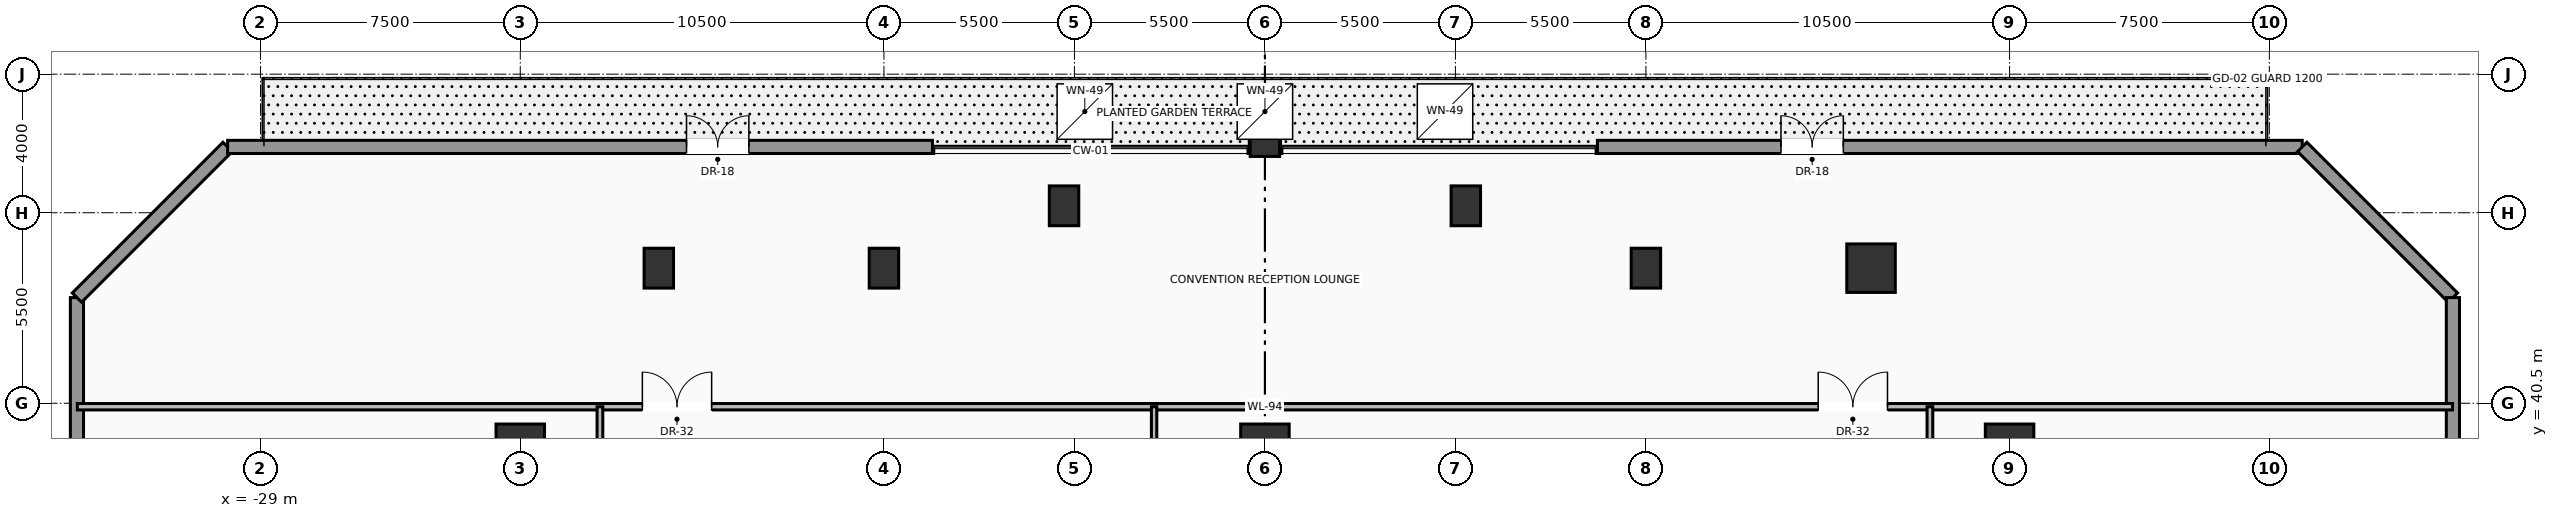
"""IFC4 building model, lengths in metres.
Left out: names, types, materials, properties, quantities, classifications, styles, units other than length and angle.
Written with IfcOpenShell. Run it as: python <this file> out.ifc"""

import sys

from ifc_helpers import new_model, si_unit, direction, frame, frame_2d, origin, origin_2d, place, context, subcontext, project, spatial, rectangle, hollow_rectangle, extrude, source, transform, mapped, element, fill, save


model = new_model("IFC4")
c1 = context("Model", 3, precision=1e-05, world=origin(), true_north=direction((0.0, 1.0)))
c2 = subcontext(c1, "Body", "Model", "MODEL_VIEW")
j1 = project(units=[si_unit("LENGTHUNIT", "METRE"), si_unit("PLANEANGLEUNIT", "RADIAN")], contexts=[c1])
p1 = place(None, origin())
s1 = spatial("IfcSite", under=j1, at=p1, CompositionType="ELEMENT")
p2 = place(p1, origin())
s2 = spatial("IfcBuilding", under=s1, at=p2, CompositionType="ELEMENT")
p3 = place(p2, frame((0.0, 0.0, 5.5)))
s3 = spatial("IfcBuildingStorey", under=s2, at=p3, CompositionType="ELEMENT", Elevation=5.5)
m1 = source(origin(), c2, "Body", "SweptSolid", [
    extrude(rectangle(XDim=0.85, YDim=1.15, at=origin_2d()), origin(), (0.0, 0.0, 1.0), 5.16),
])
for number, where, z_axis, x_axis in (
    (1, (-5.8, 46.2, 0.0), (0.0, 0.0, 1.0), (1.0, 0.0, 0.0)),
    (2, (5.8, 46.2, 0.0), (0.0, 0.0, 1.0), (1.0, 0.0, 0.0)),
    (3, (0.0, 48.2, 0.0), (0.0, 0.0, 1.0), (1.0, 0.0, 0.0)),
):
    element("IfcColumn", number, at=place(p3, frame(where, z_axis=z_axis, x_axis=x_axis)), inside=s3, PredefinedType="COLUMN", context=c2, shape_type="MappedRepresentation", body=[
        mapped(m1, transform((0.0, 0.0, 0.0), scale=1.0)),
    ])
m2 = source(origin(), c2, "Body", "SweptSolid", [
    extrude(hollow_rectangle(XDim=1.4, YDim=1.4, WallThickness=0.07, at=origin_2d()), origin(), (0.0, 0.0, 1.0), 5.5),
])
p4 = place(p3, frame((-21.5, 39.2, 0.0), z_axis=(0.0, 0.0, 1.0), x_axis=(1.0, 0.0, 0.0)))
e4 = element("IfcColumn", 4, at=p4, inside=s3, PredefinedType="COLUMN", context=c2, shape_type="MappedRepresentation", body=[
    mapped(m2, transform((0.0, 0.0, 0.0), scale=1.0)),
])
m3 = source(origin(), c2, "Body", "SweptSolid", [
    extrude(rectangle(XDim=0.85, YDim=1.15, at=origin_2d()), origin(), (0.0, 0.0, 1.0), 5.5),
])
p5 = place(p3, frame((-11.0, 44.4, 0.0), z_axis=(0.0, 0.0, 1.0), x_axis=(1.0, 0.0, 0.0)))
e5 = element("IfcColumn", 5, at=p5, inside=s3, PredefinedType="COLUMN", context=c2, shape_type="MappedRepresentation", body=[
    mapped(m3, transform((0.0, 0.0, 0.0), scale=1.0)),
])
p6 = place(p3, frame((0.0, 39.2, 0.0), z_axis=(0.0, 0.0, 1.0), x_axis=(1.0, 0.0, 0.0)))
e6 = element("IfcColumn", 6, at=p6, inside=s3, PredefinedType="COLUMN", context=c2, shape_type="MappedRepresentation", body=[
    mapped(m2, transform((0.0, 0.0, 0.0), scale=1.0)),
])
p7 = place(p3, frame((11.0, 44.4, 0.0), z_axis=(0.0, 0.0, 1.0), x_axis=(1.0, 0.0, 0.0)))
e7 = element("IfcColumn", 7, at=p7, inside=s3, PredefinedType="COLUMN", context=c2, shape_type="MappedRepresentation", body=[
    mapped(m3, transform((0.0, 0.0, 0.0), scale=1.0)),
])
p8 = place(p3, frame((21.5, 39.2, 0.0), z_axis=(0.0, 0.0, 1.0), x_axis=(1.0, 0.0, 0.0)))
e8 = element("IfcColumn", 8, at=p8, inside=s3, PredefinedType="COLUMN", context=c2, shape_type="MappedRepresentation", body=[
    mapped(m2, transform((0.0, 0.0, 0.0), scale=1.0)),
])
p9 = place(p3, frame((-17.5, 44.4, 0.0), z_axis=(0.0, 0.0, 1.0), x_axis=(1.0, 0.0, 0.0)))
e9 = element("IfcColumn", 9, at=p9, inside=s3, PredefinedType="COLUMN", context=c2, shape_type="MappedRepresentation", body=[
    mapped(m3, transform((0.0, 0.0, 0.0), scale=1.0)),
])
p10 = place(p3, frame((17.5, 44.4, 0.0), z_axis=(0.0, 0.0, 1.0), x_axis=(1.0, 0.0, 0.0)))
e10 = element("IfcColumn", 10, at=p10, inside=s3, PredefinedType="COLUMN", context=c2, shape_type="MappedRepresentation", body=[
    mapped(m2, transform((0.0, 0.0, 0.0), scale=1.0)),
])
p11 = place(p3, frame((-34.3, 4.35, 0.0), z_axis=(0.0, 0.0, 1.0), x_axis=(0.0, 1.0, 0.0)))
e11 = element("IfcWall", 11, at=p11, inside=s3, PredefinedType="SOLIDWALL", context=c2, shape_type="SweptSolid", body=[
    extrude(rectangle(XDim=39.2, YDim=0.38, at=frame_2d((19.6, 0.0))), origin(), (0.0, 0.0, 1.0), 4.11),
])
p12 = place(p11, frame((6.75, 0.0, 0.95)))
e12 = element("IfcOpeningElement", 12, at=p12, cuts=e11, PredefinedType="OPENING", context=c2, shape_type="SweptSolid", body=[
    extrude(rectangle(XDim=1.8, YDim=2.4, at=frame_2d((0.9, 1.2))), frame((0.0, 0.2, 0.0), z_axis=(0.0, -1.0, 0.0), x_axis=(1.0, 0.0, 0.0)), (0.0, 0.0, 1.0), 0.4),
])
p13 = place(p11, frame((17.25, 0.0, 0.95)))
e13 = element("IfcOpeningElement", 13, at=p13, cuts=e11, PredefinedType="OPENING", context=c2, shape_type="SweptSolid", body=[
    extrude(rectangle(XDim=1.8, YDim=2.4, at=frame_2d((0.9, 1.2))), frame((0.0, 0.2, 0.0), z_axis=(0.0, -1.0, 0.0), x_axis=(1.0, 0.0, 0.0)), (0.0, 0.0, 1.0), 0.4),
])
p14 = place(p11, frame((27.75, 0.0, 0.95)))
e14 = element("IfcOpeningElement", 14, at=p14, cuts=e11, PredefinedType="OPENING", context=c2, shape_type="SweptSolid", body=[
    extrude(rectangle(XDim=1.8, YDim=2.4, at=frame_2d((0.9, 1.2))), frame((0.0, 0.2, 0.0), z_axis=(0.0, -1.0, 0.0), x_axis=(1.0, 0.0, 0.0)), (0.0, 0.0, 1.0), 0.4),
])
p15 = place(p3, frame((-34.3, 43.55, 0.0), z_axis=(0.0, 0.0, 1.0), x_axis=(0.70712662395, 0.707086937867, 0.0)))
e15 = element("IfcWall", 15, at=p15, inside=s3, PredefinedType="SOLIDWALL", context=c2, shape_type="SweptSolid", body=[
    extrude(rectangle(XDim=6.152, YDim=0.38, at=frame_2d((3.076, 0.0))), origin(), (0.0, 0.0, 1.0), 4.11),
])
p16 = place(p3, frame((-0.45, 47.9, 0.0), z_axis=(0.0, 0.0, 1.0), x_axis=(1.0, 0.0, 0.0)))
e16 = element("IfcWall", 16, at=p16, inside=s3, PredefinedType="SOLIDWALL", context=c2, shape_type="SweptSolid", body=[
    extrude(rectangle(XDim=0.9, YDim=0.38, at=frame_2d((0.45, 0.0))), origin(), (0.0, 0.0, 1.0), 4.11),
])
p17 = place(p3, frame((-29.95, 47.9, 0.0), z_axis=(0.0, 0.0, 1.0), x_axis=(1.0, 0.0, 0.0)))
e17 = element("IfcWall", 17, at=p17, inside=s3, PredefinedType="SOLIDWALL", context=c2, shape_type="SweptSolid", body=[
    extrude(rectangle(XDim=20.35, YDim=0.38, at=frame_2d((10.175, 0.0))), origin(), (0.0, 0.0, 1.0), 4.11),
])
p18 = place(p17, frame((13.25, 0.0, 0.0)))
e18 = element("IfcOpeningElement", 18, at=p18, cuts=e17, PredefinedType="OPENING", context=c2, shape_type="SweptSolid", body=[
    extrude(rectangle(XDim=1.8, YDim=2.4, at=frame_2d((0.9, 1.2))), frame((0.0, 0.2, 0.0), z_axis=(0.0, -1.0, 0.0), x_axis=(1.0, 0.0, 0.0)), (0.0, 0.0, 1.0), 0.4),
])
p19 = place(p3, frame((9.6, 47.9, 0.0), z_axis=(0.0, 0.0, 1.0), x_axis=(1.0, 0.0, 0.0)))
e19 = element("IfcWall", 19, at=p19, inside=s3, PredefinedType="SOLIDWALL", context=c2, shape_type="SweptSolid", body=[
    extrude(rectangle(XDim=20.35, YDim=0.38, at=frame_2d((10.175, 0.0))), origin(), (0.0, 0.0, 1.0), 4.11),
])
p20 = place(p19, frame((5.3, 0.0, 0.0)))
e20 = element("IfcOpeningElement", 20, at=p20, cuts=e19, PredefinedType="OPENING", context=c2, shape_type="SweptSolid", body=[
    extrude(rectangle(XDim=1.8, YDim=2.4, at=frame_2d((0.9, 1.2))), frame((0.0, 0.2, 0.0), z_axis=(0.0, -1.0, 0.0), x_axis=(1.0, 0.0, 0.0)), (0.0, 0.0, 1.0), 0.4),
])
p21 = place(p3, frame((29.95, 47.9, 0.0), z_axis=(0.0, 0.0, 1.0), x_axis=(0.70712662395, -0.707086937867, 0.0)))
e21 = element("IfcWall", 21, at=p21, inside=s3, PredefinedType="SOLIDWALL", context=c2, shape_type="SweptSolid", body=[
    extrude(rectangle(XDim=6.152, YDim=0.38, at=frame_2d((3.076, 0.0))), origin(), (0.0, 0.0, 1.0), 4.11),
])
p22 = place(p3, frame((34.3, 43.55, 0.0), z_axis=(0.0, 0.0, 1.0), x_axis=(0.0, -1.0, 0.0)))
e22 = element("IfcWall", 22, at=p22, inside=s3, PredefinedType="SOLIDWALL", context=c2, shape_type="SweptSolid", body=[
    extrude(rectangle(XDim=39.2, YDim=0.38, at=frame_2d((19.6, 0.0))), origin(), (0.0, 0.0, 1.0), 4.11),
])
p23 = place(p22, frame((30.65, 0.0, 0.95)))
e23 = element("IfcOpeningElement", 23, at=p23, cuts=e22, PredefinedType="OPENING", context=c2, shape_type="SweptSolid", body=[
    extrude(rectangle(XDim=1.8, YDim=2.4, at=frame_2d((0.9, 1.2))), frame((0.0, 0.2, 0.0), z_axis=(0.0, -1.0, 0.0), x_axis=(1.0, 0.0, 0.0)), (0.0, 0.0, 1.0), 0.4),
])
p24 = place(p22, frame((20.15, 0.0, 0.95)))
e24 = element("IfcOpeningElement", 24, at=p24, cuts=e22, PredefinedType="OPENING", context=c2, shape_type="SweptSolid", body=[
    extrude(rectangle(XDim=1.8, YDim=2.4, at=frame_2d((0.9, 1.2))), frame((0.0, 0.2, 0.0), z_axis=(0.0, -1.0, 0.0), x_axis=(1.0, 0.0, 0.0)), (0.0, 0.0, 1.0), 0.4),
])
p25 = place(p22, frame((9.65, 0.0, 0.95)))
e25 = element("IfcOpeningElement", 25, at=p25, cuts=e22, PredefinedType="OPENING", context=c2, shape_type="SweptSolid", body=[
    extrude(rectangle(XDim=1.8, YDim=2.4, at=frame_2d((0.9, 1.2))), frame((0.0, 0.2, 0.0), z_axis=(0.0, -1.0, 0.0), x_axis=(1.0, 0.0, 0.0)), (0.0, 0.0, 1.0), 0.4),
])
p26 = place(p3, frame((-34.29, 40.4, 0.0), z_axis=(0.0, 0.0, 1.0), x_axis=(1.0, 0.0, 0.0)))
e26 = element("IfcWall", 26, at=p26, inside=s3, PredefinedType="PARTITIONING", context=c2, shape_type="SweptSolid", body=[
    extrude(rectangle(XDim=68.58, YDim=0.185, at=frame_2d((34.29, 0.0))), origin(), (0.0, 0.0, 1.0), 4.122),
])
p27 = place(p26, frame((16.315, 0.0, 0.0)))
e27 = element("IfcOpeningElement", 27, at=p27, cuts=e26, PredefinedType="OPENING", context=c2, shape_type="SweptSolid", body=[
    extrude(rectangle(XDim=2.0, YDim=2.4, at=frame_2d((1.0, 1.2))), frame((0.0, 0.103, 0.0), z_axis=(0.0, -1.0, 0.0), x_axis=(1.0, 0.0, 0.0)), (0.0, 0.0, 1.0), 0.205),
])
p28 = place(p26, frame((50.265, 0.0, 0.0)))
e28 = element("IfcOpeningElement", 28, at=p28, cuts=e26, PredefinedType="OPENING", context=c2, shape_type="SweptSolid", body=[
    extrude(rectangle(XDim=2.0, YDim=2.4, at=frame_2d((1.0, 1.2))), frame((0.0, 0.103, 0.0), z_axis=(0.0, -1.0, 0.0), x_axis=(1.0, 0.0, 0.0)), (0.0, 0.0, 1.0), 0.205),
])
p29 = place(p3, frame((-19.2, 19.2, 0.0), z_axis=(0.0, 0.0, 1.0), x_axis=(0.0, 1.0, 0.0)))
e29 = element("IfcWall", 29, at=p29, inside=s3, PredefinedType="PARTITIONING", context=c2, shape_type="SweptSolid", body=[
    extrude(rectangle(XDim=21.2, YDim=0.165, at=frame_2d((10.6, 0.0))), origin(), (0.0, 0.0, 1.0), 4.122),
])
p30 = place(p29, frame((8.824, 0.0, 0.0)))
e30 = element("IfcOpeningElement", 30, at=p30, cuts=e29, PredefinedType="OPENING", context=c2, shape_type="SweptSolid", body=[
    extrude(rectangle(XDim=1.5, YDim=2.25, at=frame_2d((0.75, 1.125))), frame((0.0, 0.093, 0.0), z_axis=(0.0, -1.0, 0.0), x_axis=(1.0, 0.0, 0.0)), (0.0, 0.0, 1.0), 0.185),
])
p31 = place(p3, frame((19.2, 19.2, 0.0), z_axis=(0.0, 0.0, 1.0), x_axis=(0.0, 1.0, 0.0)))
e31 = element("IfcWall", 31, at=p31, inside=s3, PredefinedType="PARTITIONING", context=c2, shape_type="SweptSolid", body=[
    extrude(rectangle(XDim=21.2, YDim=0.165, at=frame_2d((10.6, 0.0))), origin(), (0.0, 0.0, 1.0), 4.122),
])
p32 = place(p31, frame((8.824, 0.0, 0.0)))
e32 = element("IfcOpeningElement", 32, at=p32, cuts=e31, PredefinedType="OPENING", context=c2, shape_type="SweptSolid", body=[
    extrude(rectangle(XDim=1.5, YDim=2.25, at=frame_2d((0.75, 1.125))), frame((0.0, 0.093, 0.0), z_axis=(0.0, -1.0, 0.0), x_axis=(1.0, 0.0, 0.0)), (0.0, 0.0, 1.0), 0.185),
])
p33 = place(p3, frame((-3.2, 19.2, 0.0), z_axis=(0.0, 0.0, 1.0), x_axis=(0.0, 1.0, 0.0)))
e33 = element("IfcWall", 33, at=p33, inside=s3, PredefinedType="MOVABLE", context=c2, shape_type="SweptSolid", body=[
    extrude(rectangle(XDim=21.2, YDim=0.155, at=frame_2d((10.6, 0.0))), origin(), (0.0, 0.0, 1.0), 4.122),
])
p34 = place(p33, frame((9.85, 0.0, 0.0)))
e34 = element("IfcOpeningElement", 34, at=p34, cuts=e33, PredefinedType="OPENING", context=c2, shape_type="SweptSolid", body=[
    extrude(rectangle(XDim=1.5, YDim=2.25, at=frame_2d((0.75, 1.125))), frame((0.0, 0.087, 0.0), z_axis=(0.0, -1.0, 0.0), x_axis=(1.0, 0.0, 0.0)), (0.0, 0.0, 1.0), 0.175),
])
m4 = source(origin(), c2, "Body", "SweptSolid", [
    extrude(rectangle(XDim=1.8, YDim=2.4, at=frame_2d((0.9, 1.2))), frame((0.0, 0.025, 0.0), z_axis=(0.0, -1.0, 0.0), x_axis=(1.0, 0.0, 0.0)), (0.0, 0.0, 1.0), 0.05),
])
p35 = place(p18, origin())
e35 = element("IfcDoor", 35, at=p35, inside=s3, OperationType="DOUBLE_DOOR_SINGLE_SWING", PredefinedType="DOOR", context=c2, shape_type="MappedRepresentation", body=[
    mapped(m4, transform((0.0, 0.0, 0.0), scale=1.0)),
])
fill(e18, e35)
p36 = place(p20, origin())
e36 = element("IfcDoor", 36, at=p36, inside=s3, OperationType="DOUBLE_DOOR_SINGLE_SWING", PredefinedType="DOOR", context=c2, shape_type="MappedRepresentation", body=[
    mapped(m4, transform((0.0, 0.0, 0.0), scale=1.0)),
])
fill(e20, e36)
p37 = place(p3, frame((0.0, 0.0, -0.35)))
p38 = place(p37, frame((-5.2, 48.92, 0.3)))
e37 = element("IfcWindow", 37, at=p38, inside=s3, PartitioningType="SINGLE_PANEL", PredefinedType="SKYLIGHT", context=c2, shape_type="SweptSolid", body=[
    extrude(rectangle(XDim=1.6, YDim=1.6, at=origin_2d()), origin(), (0.0, 0.0, 1.0), 0.05),
])
p39 = place(p37, frame((0.0, 48.92, 0.3)))
e38 = element("IfcWindow", 38, at=p39, inside=s3, PartitioningType="SINGLE_PANEL", PredefinedType="SKYLIGHT", context=c2, shape_type="SweptSolid", body=[
    extrude(rectangle(XDim=1.6, YDim=1.6, at=origin_2d()), origin(), (0.0, 0.0, 1.0), 0.05),
])
p40 = place(p37, frame((5.2, 48.92, 0.3)))
e39 = element("IfcWindow", 39, at=p40, inside=s3, PartitioningType="SINGLE_PANEL", PredefinedType="SKYLIGHT", context=c2, shape_type="SweptSolid", body=[
    extrude(rectangle(XDim=1.6, YDim=1.6, at=origin_2d()), origin(), (0.0, 0.0, 1.0), 0.05),
])
m5 = source(origin(), c2, "Body", "SweptSolid", [
    extrude(rectangle(XDim=2.0, YDim=2.4, at=frame_2d((1.0, 1.2))), frame((0.0, 0.025, 0.0), z_axis=(0.0, -1.0, 0.0), x_axis=(1.0, 0.0, 0.0)), (0.0, 0.0, 1.0), 0.05),
])
p41 = place(p27, origin())
e40 = element("IfcDoor", 40, at=p41, inside=s3, OperationType="DOUBLE_DOOR_SINGLE_SWING", PredefinedType="DOOR", context=c2, shape_type="MappedRepresentation", body=[
    mapped(m5, transform((0.0, 0.0, 0.0), scale=1.0)),
])
fill(e27, e40)
p42 = place(p28, origin())
e41 = element("IfcDoor", 41, at=p42, inside=s3, OperationType="DOUBLE_DOOR_SINGLE_SWING", PredefinedType="DOOR", context=c2, shape_type="MappedRepresentation", body=[
    mapped(m5, transform((0.0, 0.0, 0.0), scale=1.0)),
])
fill(e28, e41)
save(model, sys.argv[1])
